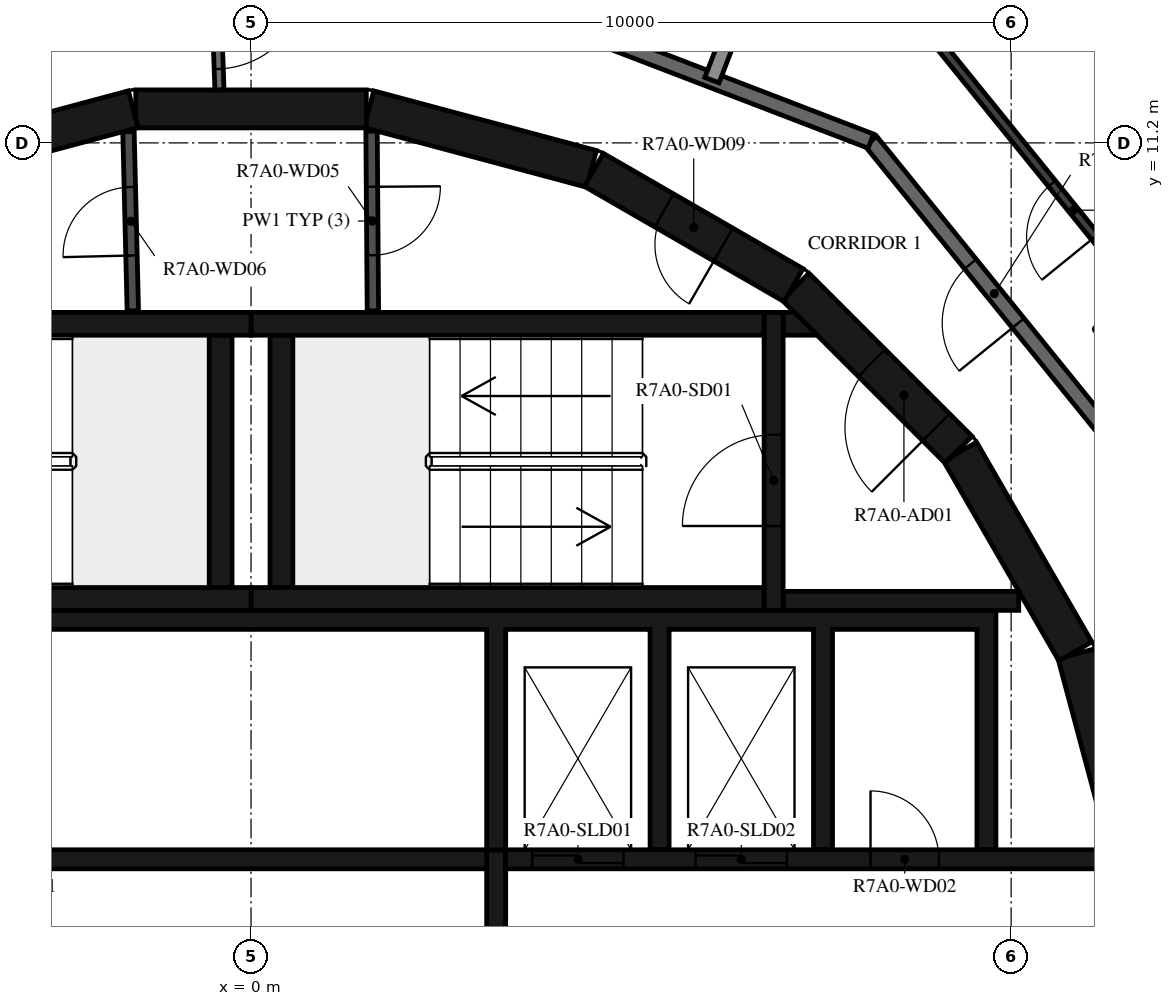
"""IFC4 building model, lengths in metres.
Left out: names, types, materials, properties, quantities, classifications, styles, units other than length and angle.
Written with IfcOpenShell. Run it as: python <this file> out.ifc"""

import sys

from ifc_helpers import new_model, si_unit, direction, frame, frame_2d, origin, place, context, subcontext, project, spatial, polyline, rectangle, outline, extrude, element, fill, save


model = new_model("IFC4")
c1 = context("Model", 3, precision=1e-05, world=origin(), true_north=direction((0.0, 1.0)))
c2 = subcontext(c1, "Body", "Model", "MODEL_VIEW")
j1 = project(units=[si_unit("LENGTHUNIT", "METRE"), si_unit("PLANEANGLEUNIT", "RADIAN")], contexts=[c1])
p1 = place(None, origin())
s1 = spatial("IfcSite", under=j1, at=p1, CompositionType="ELEMENT")
p2 = place(p1, origin())
s2 = spatial("IfcBuilding", under=s1, at=p2, CompositionType="ELEMENT")
p3 = place(p2, frame((0.0, 0.0, 270.4)))
s3 = spatial("IfcBuildingStorey", under=s2, at=p3, CompositionType="ELEMENT", Elevation=270.4)
for number, where, z_axis, x_axis in (
    (1, (11.643, 1.55, 0.0), (0.0, 0.0, 1.0), (-0.259, 0.966, 0.0)),
    (2, (10.845, 4.51, 0.0), (0.0, 0.0, 1.0), (-0.5, 0.866, 0.0)),
):
    element("IfcWall", number, at=place(p3, frame(where, z_axis=z_axis, x_axis=x_axis)), inside=s3, PredefinedType="SHEAR", context=c2, shape_type="SweptSolid", body=[
        extrude(rectangle(XDim=3.033, YDim=0.5, at=frame_2d((1.516, 0.0))), origin(), (0.0, 0.0, 1.0), 3.12),
    ])
p4 = place(p3, frame((9.308, 7.164, 0.0), z_axis=(0.0, 0.0, 1.0), x_axis=(-0.707106781187, 0.707106781187, 0.0)))
e3 = element("IfcWall", 3, at=p4, inside=s3, PredefinedType="SHEAR", context=c2, shape_type="SweptSolid", body=[
    extrude(rectangle(XDim=3.032, YDim=0.5, at=frame_2d((1.516, 0.0))), origin(), (0.0, 0.0, 1.0), 3.12),
])
p5 = place(p4, frame((0.416, 0.0, 0.0)))
e4 = element("IfcOpeningElement", 4, at=p5, cuts=e3, PredefinedType="OPENING", context=c2, shape_type="SweptSolid", body=[
    extrude(rectangle(XDim=1.2, YDim=2.1, at=frame_2d((0.6, 1.05))), frame((0.0, 0.26, 0.0), z_axis=(0.0, -1.0, 0.0), x_axis=(1.0, 0.0, 0.0)), (0.0, 0.0, 1.0), 0.52),
])
p6 = place(p3, frame((7.137, 9.329, 0.0), z_axis=(0.0, 0.0, 1.0), x_axis=(-0.865975092491, 0.500087131594, 0.0)))
e5 = element("IfcWall", 5, at=p6, inside=s3, PredefinedType="SHEAR", context=c2, shape_type="SweptSolid", body=[
    extrude(rectangle(XDim=3.033, YDim=0.5, at=frame_2d((1.516, 0.0))), origin(), (0.0, 0.0, 1.0), 3.12),
])
p7 = place(p6, frame((1.066, 0.0, 0.0)))
e6 = element("IfcOpeningElement", 6, at=p7, cuts=e5, PredefinedType="OPENING", context=c2, shape_type="SweptSolid", body=[
    extrude(rectangle(XDim=0.9, YDim=2.1, at=frame_2d((0.45, 1.05))), frame((0.0, 0.26, 0.0), z_axis=(0.0, -1.0, 0.0), x_axis=(1.0, 0.0, 0.0)), (0.0, 0.0, 1.0), 0.52),
])
for number, where, z_axis, x_axis in (
    (7, (4.479, 10.858, 0.0), (0.0, 0.0, 1.0), (-0.966, 0.259, 0.0)),
    (8, (1.516, 11.647, 0.0), (0.0, 0.0, 1.0), (-1.0, 0.0, 0.0)),
    (9, (-1.55, 11.643, 0.0), (0.0, 0.0, 1.0), (-0.966, -0.259, 0.0)),
):
    element("IfcWall", number, at=place(p3, frame(where, z_axis=z_axis, x_axis=x_axis)), inside=s3, PredefinedType="SHEAR", context=c2, shape_type="SweptSolid", body=[
        extrude(rectangle(XDim=3.033, YDim=0.5, at=frame_2d((1.516, 0.0))), origin(), (0.0, 0.0, 1.0), 3.12),
    ])
for number, where, z_axis, x_axis in (
    (10, (0.0, 5.2, 0.0), (0.0, 0.0, 1.0), (1.0, 0.0, 0.0)),
    (11, (0.0, 8.82, 0.0), (0.0, 0.0, 1.0), (1.0, 0.0, 0.0)),
):
    element("IfcWall", number, at=place(p3, frame(where, z_axis=z_axis, x_axis=x_axis)), inside=s3, PredefinedType="SHEAR", context=c2, shape_type="SweptSolid", body=[
        extrude(rectangle(XDim=6.75, YDim=0.3, at=frame_2d((3.375, 0.0))), origin(), (0.0, 0.0, 1.0), 3.12),
    ])
p8 = place(p3, frame((0.4, 5.35, 0.0), z_axis=(0.0, 0.0, 1.0), x_axis=(0.0, 1.0, 0.0)))
e12 = element("IfcWall", 12, at=p8, inside=s3, PredefinedType="SHEAR", context=c2, shape_type="SweptSolid", body=[
    extrude(rectangle(XDim=3.32, YDim=0.3, at=frame_2d((1.66, 0.0))), origin(), (0.0, 0.0, 1.0), 3.12),
])
p9 = place(p3, frame((6.875, 5.05, 0.0), z_axis=(0.0, 0.0, 1.0), x_axis=(0.0, 1.0, 0.0)))
e13 = element("IfcWall", 13, at=p9, inside=s3, PredefinedType="SHEAR", context=c2, shape_type="SweptSolid", body=[
    extrude(rectangle(XDim=3.92, YDim=0.25, at=frame_2d((1.96, 0.0))), origin(), (0.0, 0.0, 1.0), 3.12),
])
p10 = place(p9, frame((1.11, 0.0, 0.0)))
e14 = element("IfcOpeningElement", 14, at=p10, cuts=e13, PredefinedType="OPENING", context=c2, shape_type="SweptSolid", body=[
    extrude(rectangle(XDim=1.2, YDim=2.1, at=frame_2d((0.6, 1.05))), frame((0.0, 0.135, 0.0), z_axis=(0.0, -1.0, 0.0), x_axis=(1.0, 0.0, 0.0)), (0.0, 0.0, 1.0), 0.27),
])
p11 = place(p3, frame((7.0, 5.175, 0.0), z_axis=(0.0, 0.0, 1.0), x_axis=(1.0, 0.0, 0.0)))
e15 = element("IfcWall", 15, at=p11, inside=s3, PredefinedType="SHEAR", context=c2, shape_type="SweptSolid", body=[
    extrude(rectangle(XDim=3.1, YDim=0.25, at=frame_2d((1.55, 0.0))), origin(), (0.0, 0.0, 1.0), 3.12),
])
p12 = place(p3, origin())
e16 = element("IfcWall", 16, at=p12, inside=s3, PredefinedType="SHEAR", context=c2, shape_type="SweptSolid", body=[
    extrude(outline(polyline([(7.448, 8.67), (7.0, 8.67), (7.0, 8.97), (7.148, 8.97), (7.448, 8.67)])), origin(), (0.0, 0.0, 1.0), 3.12),
])
for number, where, z_axis, x_axis in (
    (17, (-6.75, 5.2, 0.0), (0.0, 0.0, 1.0), (1.0, 0.0, 0.0)),
    (18, (-6.75, 8.82, 0.0), (0.0, 0.0, 1.0), (1.0, 0.0, 0.0)),
):
    element("IfcWall", number, at=place(p3, frame(where, z_axis=z_axis, x_axis=x_axis)), inside=s3, PredefinedType="SHEAR", context=c2, shape_type="SweptSolid", body=[
        extrude(rectangle(XDim=6.75, YDim=0.3, at=frame_2d((3.375, 0.0))), origin(), (0.0, 0.0, 1.0), 3.12),
    ])
p13 = place(p3, frame((-0.4, 5.35, 0.0), z_axis=(0.0, 0.0, 1.0), x_axis=(0.0, 1.0, 0.0)))
e19 = element("IfcWall", 19, at=p13, inside=s3, PredefinedType="SHEAR", context=c2, shape_type="SweptSolid", body=[
    extrude(rectangle(XDim=3.32, YDim=0.3, at=frame_2d((1.66, 0.0))), origin(), (0.0, 0.0, 1.0), 3.12),
])
p14 = place(p3, origin())
e20 = element("IfcWall", 20, at=p14, inside=s3, PredefinedType="SHEAR", context=c2, shape_type="SweptSolid", body=[
    extrude(outline(polyline([(-9.8, 1.9), (-9.55, 1.9), (-9.55, 4.8), (3.1, 4.8), (3.1, 1.9), (3.35, 1.9), (3.35, 4.8), (5.25, 4.8), (5.25, 1.9), (5.5, 1.9), (5.5, 4.8), (7.4, 4.8), (7.4, 1.9), (7.65, 1.9), (7.65, 4.8), (9.55, 4.8), (9.55, 1.9), (9.8, 1.9), (9.8, 4.8), (9.8, 5.05), (-9.8, 5.05), (-9.8, 4.8), (-9.8, 1.9)])), origin(), (0.0, 0.0, 1.0), 3.12),
])
p15 = place(p3, frame((-11.28, 1.775, 0.0), z_axis=(0.0, 0.0, 1.0), x_axis=(1.0, 0.0, 0.0)))
e21 = element("IfcWall", 21, at=p15, inside=s3, PredefinedType="SHEAR", context=c2, shape_type="SweptSolid", body=[
    extrude(rectangle(XDim=14.38, YDim=0.25, at=frame_2d((7.19, 0.0))), origin(), (0.0, 0.0, 1.0), 3.12),
])
p16 = place(p15, frame((7.605, 0.0, 0.0)))
e22 = element("IfcOpeningElement", 22, at=p16, cuts=e21, PredefinedType="OPENING", context=c2, shape_type="SweptSolid", body=[
    extrude(rectangle(XDim=0.9, YDim=2.1, at=frame_2d((0.45, 1.05))), frame((0.0, 0.135, 0.0), z_axis=(0.0, -1.0, 0.0), x_axis=(1.0, 0.0, 0.0)), (0.0, 0.0, 1.0), 0.27),
])
p17 = place(p3, frame((3.35, 1.775, 0.0), z_axis=(0.0, 0.0, 1.0), x_axis=(1.0, 0.0, 0.0)))
e23 = element("IfcWall", 23, at=p17, inside=s3, PredefinedType="SHEAR", context=c2, shape_type="SweptSolid", body=[
    extrude(rectangle(XDim=7.93, YDim=0.25, at=frame_2d((3.965, 0.0))), origin(), (0.0, 0.0, 1.0), 3.12),
])
p18 = place(p17, frame((0.35, 0.0, 0.0)))
e24 = element("IfcOpeningElement", 24, at=p18, cuts=e23, PredefinedType="OPENING", context=c2, shape_type="SweptSolid", body=[
    extrude(rectangle(XDim=1.2, YDim=2.4, at=frame_2d((0.6, 1.2))), frame((0.0, 0.135, 0.0), z_axis=(0.0, -1.0, 0.0), x_axis=(1.0, 0.0, 0.0)), (0.0, 0.0, 1.0), 0.27),
])
p19 = place(p17, frame((2.5, 0.0, 0.0)))
e25 = element("IfcOpeningElement", 25, at=p19, cuts=e23, PredefinedType="OPENING", context=c2, shape_type="SweptSolid", body=[
    extrude(rectangle(XDim=1.2, YDim=2.4, at=frame_2d((0.6, 1.2))), frame((0.0, 0.135, 0.0), z_axis=(0.0, -1.0, 0.0), x_axis=(1.0, 0.0, 0.0)), (0.0, 0.0, 1.0), 0.27),
])
p20 = place(p17, frame((4.8, 0.0, 0.0)))
e26 = element("IfcOpeningElement", 26, at=p20, cuts=e23, PredefinedType="OPENING", context=c2, shape_type="SweptSolid", body=[
    extrude(rectangle(XDim=0.9, YDim=2.1, at=frame_2d((0.45, 1.05))), frame((0.0, 0.135, 0.0), z_axis=(0.0, -1.0, 0.0), x_axis=(1.0, 0.0, 0.0)), (0.0, 0.0, 1.0), 0.27),
])
p21 = place(p3, frame((3.225, -1.9, 0.0), z_axis=(0.0, 0.0, 1.0), x_axis=(0.0, 1.0, 0.0)))
e27 = element("IfcWall", 27, at=p21, inside=s3, PredefinedType="SHEAR", context=c2, shape_type="SweptSolid", body=[
    extrude(rectangle(XDim=3.8, YDim=0.25, at=frame_2d((1.9, 0.0))), origin(), (0.0, 0.0, 1.0), 3.12),
])
p22 = place(p3, frame((1.586, 11.354, 0.0), z_axis=(0.0, 0.0, 1.0), x_axis=(0.007227482881, -0.999973881405, 0.0)))
e28 = element("IfcWall", 28, at=p22, inside=s3, PredefinedType="PARTITIONING", context=c2, shape_type="SweptSolid", body=[
    extrude(rectangle(XDim=2.365, YDim=0.15, at=frame_2d((1.182, 0.0))), origin(), (0.0, 0.0, 1.0), 3.12),
])
p23 = place(p22, frame((0.732, 0.0, 0.0)))
e29 = element("IfcOpeningElement", 29, at=p23, cuts=e28, PredefinedType="OPENING", context=c2, shape_type="SweptSolid", body=[
    extrude(rectangle(XDim=0.9, YDim=2.1, at=frame_2d((0.45, 1.05))), frame((0.0, 0.085, 0.0), z_axis=(0.0, -1.0, 0.0), x_axis=(1.0, 0.0, 0.0)), (0.0, 0.0, 1.0), 0.17),
])
p24 = place(p3, frame((-1.555, 8.99, 0.0), z_axis=(0.0, 0.0, 1.0), x_axis=(-0.024125549686, 0.999708936567, 0.0)))
e30 = element("IfcWall", 30, at=p24, inside=s3, PredefinedType="PARTITIONING", context=c2, shape_type="SweptSolid", body=[
    extrude(rectangle(XDim=2.358, YDim=0.15, at=frame_2d((1.179, 0.0))), origin(), (0.0, 0.0, 1.0), 3.12),
])
p25 = place(p24, frame((0.729, 0.0, 0.0)))
e31 = element("IfcOpeningElement", 31, at=p25, cuts=e30, PredefinedType="OPENING", context=c2, shape_type="SweptSolid", body=[
    extrude(rectangle(XDim=0.9, YDim=2.1, at=frame_2d((0.45, 1.05))), frame((0.0, 0.085, 0.0), z_axis=(0.0, -1.0, 0.0), x_axis=(1.0, 0.0, 0.0)), (0.0, 0.0, 1.0), 0.17),
])
p26 = place(p3, frame((-0.471, 13.492, 0.0), z_axis=(0.0, 0.0, 1.0), x_axis=(0.034873173869, -0.999391745886, 0.0)))
e32 = element("IfcWall", 32, at=p26, inside=s3, PredefinedType="PARTITIONING", context=c2, shape_type="SweptSolid", body=[
    extrude(rectangle(XDim=1.596, YDim=0.12, at=frame_2d((0.798, 0.0))), origin(), (0.0, 0.0, 1.0), 3.12),
])
p27 = place(p26, frame((0.12, 0.0, 0.0)))
e33 = element("IfcOpeningElement", 33, at=p27, cuts=e32, PredefinedType="OPENING", context=c2, shape_type="SweptSolid", body=[
    extrude(rectangle(XDim=1.2, YDim=2.1, at=frame_2d((0.6, 1.05))), frame((0.0, 0.07, 0.0), z_axis=(0.0, -1.0, 0.0), x_axis=(1.0, 0.0, 0.0)), (0.0, 0.0, 1.0), 0.14),
])
p28 = place(p3, frame((12.673, 5.643, 0.0), z_axis=(0.0, 0.0, 1.0), x_axis=(-0.629302871585, 0.777160148113, 0.0)))
e34 = element("IfcWall", 34, at=p28, inside=s3, PredefinedType="STANDARD", context=c2, shape_type="SweptSolid", body=[
    extrude(rectangle(XDim=7.181, YDim=0.2, at=frame_2d((3.59, 0.0))), origin(), (0.0, 0.0, 1.0), 3.12),
])
p29 = place(p28, frame((4.1, 0.0, 0.0)))
e35 = element("IfcOpeningElement", 35, at=p29, cuts=e34, PredefinedType="OPENING", context=c2, shape_type="SweptSolid", body=[
    extrude(rectangle(XDim=1.0, YDim=2.1, at=frame_2d((0.5, 1.05))), frame((0.0, 0.11, 0.0), z_axis=(0.0, -1.0, 0.0), x_axis=(1.0, 0.0, 0.0)), (0.0, 0.0, 1.0), 0.22),
])
p30 = place(p3, frame((8.154, 11.223, 0.0), z_axis=(0.0, 0.0, 1.0), x_axis=(-0.93359073609, 0.358341090983, 0.0)))
e36 = element("IfcWall", 36, at=p30, inside=s3, PredefinedType="STANDARD", context=c2, shape_type="SweptSolid", body=[
    extrude(rectangle(XDim=7.181, YDim=0.2, at=frame_2d((3.59, 0.0))), origin(), (0.0, 0.0, 1.0), 3.12),
])
p31 = place(p3, frame((7.532, 15.85, 0.0), z_axis=(0.0, 0.0, 1.0), x_axis=(-0.358355996975, -0.933585014571, 0.0)))
e37 = element("IfcWall", 37, at=p31, inside=s3, PredefinedType="STANDARD", context=c2, shape_type="SweptSolid", body=[
    extrude(rectangle(XDim=4.096, YDim=0.2, at=frame_2d((2.048, 0.0))), origin(), (0.0, 0.0, 1.0), 2.73),
])
p32 = place(p3, frame((14.092, 6.274, 0.0), z_axis=(0.0, 0.0, 1.0), x_axis=(-0.62933367237, 0.777135206268, 0.0)))
e38 = element("IfcWall", 38, at=p32, inside=s3, PredefinedType="PARTITIONING", context=c2, shape_type="SweptSolid", body=[
    extrude(rectangle(XDim=7.985, YDim=0.12, at=frame_2d((3.992, 0.0))), origin(), (0.0, 0.0, 1.0), 3.12),
])
p33 = place(p32, frame((1.378, 0.0, 0.0)))
e39 = element("IfcOpeningElement", 39, at=p33, cuts=e38, PredefinedType="OPENING", context=c2, shape_type="SweptSolid", body=[
    extrude(rectangle(XDim=0.9, YDim=2.1, at=frame_2d((0.45, 1.05))), frame((0.0, 0.07, 0.0), z_axis=(0.0, -1.0, 0.0), x_axis=(1.0, 0.0, 0.0)), (0.0, 0.0, 1.0), 0.14),
])
p34 = place(p32, frame((4.749, 0.0, 0.0)))
e40 = element("IfcOpeningElement", 40, at=p34, cuts=e38, PredefinedType="OPENING", context=c2, shape_type="SweptSolid", body=[
    extrude(rectangle(XDim=0.9, YDim=2.1, at=frame_2d((0.45, 1.05))), frame((0.0, 0.07, 0.0), z_axis=(0.0, -1.0, 0.0), x_axis=(1.0, 0.0, 0.0)), (0.0, 0.0, 1.0), 0.14),
])
p35 = place(p10, origin())
e41 = element("IfcDoor", 41, at=p35, inside=s3, OperationType="SINGLE_SWING_LEFT", PredefinedType="DOOR", context=c2, shape_type="SweptSolid", body=[
    extrude(rectangle(XDim=1.2, YDim=2.1, at=frame_2d((0.6, 1.05))), frame((0.0, 0.025, 0.0), z_axis=(0.0, -1.0, 0.0), x_axis=(1.0, 0.0, 0.0)), (0.0, 0.0, 1.0), 0.05),
])
fill(e14, e41)
p36 = place(p5, origin())
e42 = element("IfcDoor", 42, at=p36, inside=s3, OperationType="SINGLE_SWING_RIGHT", PredefinedType="DOOR", context=c2, shape_type="SweptSolid", body=[
    extrude(rectangle(XDim=1.2, YDim=2.1, at=frame_2d((0.6, 1.05))), frame((0.0, 0.025, 0.0), z_axis=(0.0, -1.0, 0.0), x_axis=(1.0, 0.0, 0.0)), (0.0, 0.0, 1.0), 0.05),
])
fill(e4, e42)
p37 = place(p18, origin())
e43 = element("IfcDoor", 43, at=p37, inside=s3, OperationType="DOUBLE_DOOR_SLIDING", PredefinedType="DOOR", context=c2, shape_type="SweptSolid", body=[
    extrude(rectangle(XDim=1.2, YDim=2.4, at=frame_2d((0.6, 1.2))), frame((0.0, 0.025, 0.0), z_axis=(0.0, -1.0, 0.0), x_axis=(1.0, 0.0, 0.0)), (0.0, 0.0, 1.0), 0.05),
])
fill(e24, e43)
p38 = place(p19, origin())
e44 = element("IfcDoor", 44, at=p38, inside=s3, OperationType="DOUBLE_DOOR_SLIDING", PredefinedType="DOOR", context=c2, shape_type="SweptSolid", body=[
    extrude(rectangle(XDim=1.2, YDim=2.4, at=frame_2d((0.6, 1.2))), frame((0.0, 0.025, 0.0), z_axis=(0.0, -1.0, 0.0), x_axis=(1.0, 0.0, 0.0)), (0.0, 0.0, 1.0), 0.05),
])
fill(e25, e44)
p39 = place(p20, origin())
e45 = element("IfcDoor", 45, at=p39, inside=s3, OperationType="SINGLE_SWING_RIGHT", PredefinedType="DOOR", context=c2, shape_type="SweptSolid", body=[
    extrude(rectangle(XDim=0.9, YDim=2.1, at=frame_2d((0.45, 1.05))), frame((0.0, 0.025, 0.0), z_axis=(0.0, -1.0, 0.0), x_axis=(1.0, 0.0, 0.0)), (0.0, 0.0, 1.0), 0.05),
])
fill(e26, e45)
p40 = place(p23, origin())
e46 = element("IfcDoor", 46, at=p40, inside=s3, OperationType="SINGLE_SWING_LEFT", PredefinedType="DOOR", context=c2, shape_type="SweptSolid", body=[
    extrude(rectangle(XDim=0.9, YDim=2.1, at=frame_2d((0.45, 1.05))), frame((0.0, 0.025, 0.0), z_axis=(0.0, -1.0, 0.0), x_axis=(1.0, 0.0, 0.0)), (0.0, 0.0, 1.0), 0.05),
])
fill(e29, e46)
p41 = place(p25, origin())
e47 = element("IfcDoor", 47, at=p41, inside=s3, OperationType="SINGLE_SWING_RIGHT", PredefinedType="DOOR", context=c2, shape_type="SweptSolid", body=[
    extrude(rectangle(XDim=0.9, YDim=2.1, at=frame_2d((0.45, 1.05))), frame((0.0, 0.025, 0.0), z_axis=(0.0, -1.0, 0.0), x_axis=(1.0, 0.0, 0.0)), (0.0, 0.0, 1.0), 0.05),
])
fill(e31, e47)
p42 = place(p7, origin())
e48 = element("IfcDoor", 48, at=p42, inside=s3, OperationType="SINGLE_SWING_LEFT", PredefinedType="DOOR", context=c2, shape_type="SweptSolid", body=[
    extrude(rectangle(XDim=0.9, YDim=2.1, at=frame_2d((0.45, 1.05))), frame((0.0, 0.025, 0.0), z_axis=(0.0, -1.0, 0.0), x_axis=(1.0, 0.0, 0.0)), (0.0, 0.0, 1.0), 0.05),
])
fill(e6, e48)
p43 = place(p29, origin())
e49 = element("IfcDoor", 49, at=p43, inside=s3, OperationType="SINGLE_SWING_LEFT", PredefinedType="DOOR", context=c2, shape_type="SweptSolid", body=[
    extrude(rectangle(XDim=1.0, YDim=2.1, at=frame_2d((0.5, 1.05))), frame((0.0, 0.025, 0.0), z_axis=(0.0, -1.0, 0.0), x_axis=(1.0, 0.0, 0.0)), (0.0, 0.0, 1.0), 0.05),
])
fill(e35, e49)
p44 = place(p34, origin())
e50 = element("IfcDoor", 50, at=p44, inside=s3, OperationType="SINGLE_SWING_LEFT", PredefinedType="DOOR", context=c2, shape_type="SweptSolid", body=[
    extrude(rectangle(XDim=0.9, YDim=2.1, at=frame_2d((0.45, 1.05))), frame((0.0, 0.025, 0.0), z_axis=(0.0, -1.0, 0.0), x_axis=(1.0, 0.0, 0.0)), (0.0, 0.0, 1.0), 0.05),
])
fill(e40, e50)
p45 = place(p27, origin())
e51 = element("IfcDoor", 51, at=p45, inside=s3, OperationType="DOUBLE_DOOR_SINGLE_SWING", PredefinedType="DOOR", context=c2, shape_type="SweptSolid", body=[
    extrude(rectangle(XDim=1.2, YDim=2.1, at=frame_2d((0.6, 1.05))), frame((0.0, 0.025, 0.0), z_axis=(0.0, -1.0, 0.0), x_axis=(1.0, 0.0, 0.0)), (0.0, 0.0, 1.0), 0.05),
])
fill(e33, e51)
save(model, sys.argv[1])
